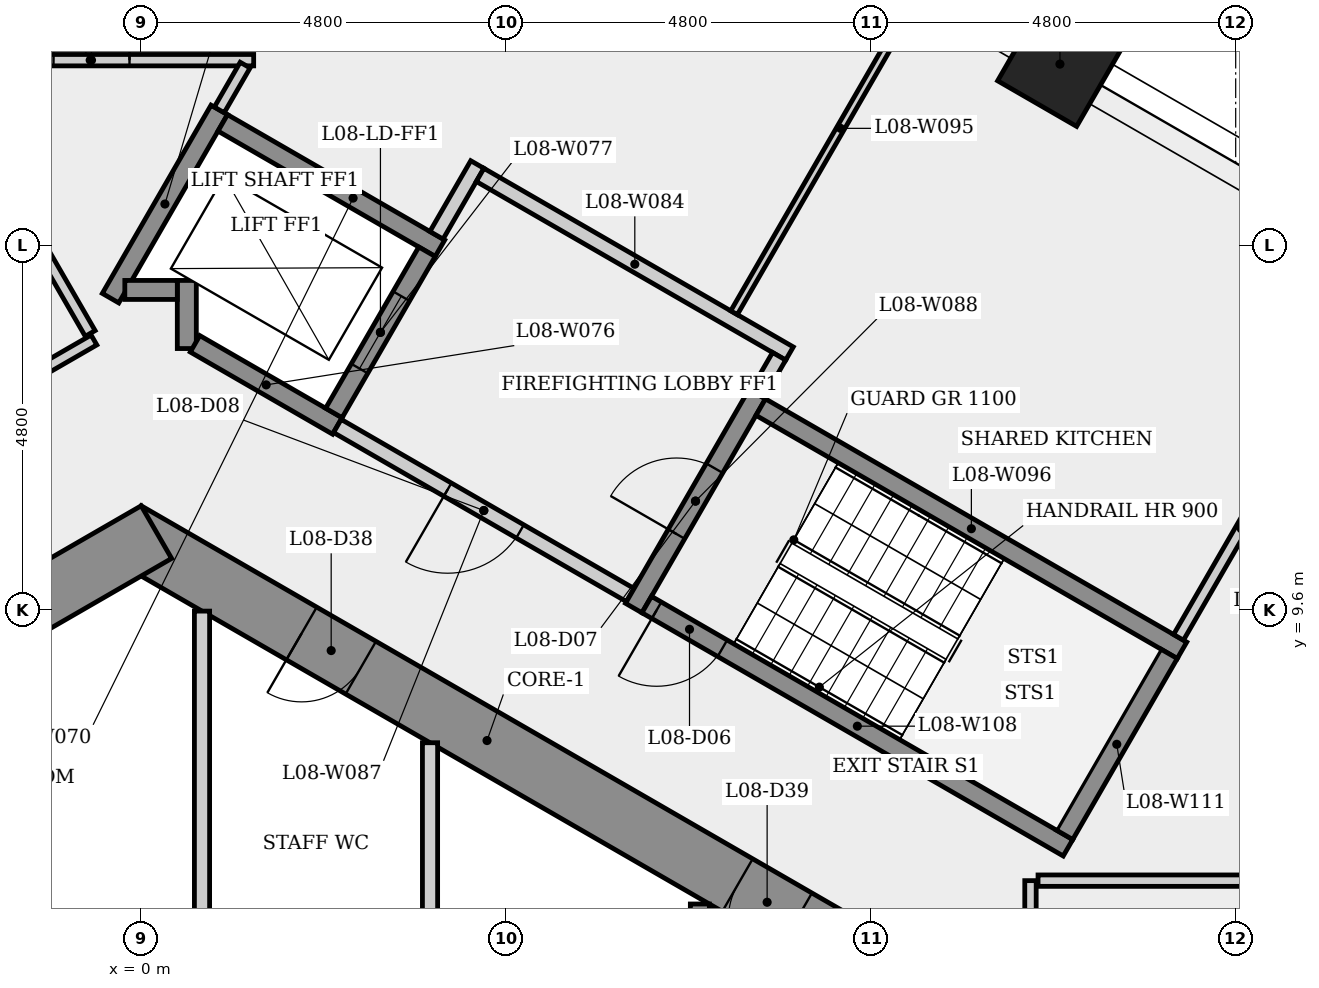
"""IFC4 building model, lengths in metres.
Left out: names, types, materials, properties, quantities, classifications, styles, units other than length and angle.
Written with IfcOpenShell. Run it as: python <this file> out.ifc"""

import sys

from ifc_helpers import new_model, si_unit, direction, frame, frame_2d, origin, origin_2d, place, context, subcontext, project, spatial, rectangle, extrude, element, fill, save


model = new_model("IFC4")
c1 = context("Model", 3, precision=1e-05, world=origin(), true_north=direction((0.0, 1.0)))
c2 = subcontext(c1, "Body", "Model", "MODEL_VIEW")
j1 = project(units=[si_unit("LENGTHUNIT", "METRE"), si_unit("PLANEANGLEUNIT", "RADIAN")], contexts=[c1])
p1 = place(None, origin())
s1 = spatial("IfcSite", under=j1, at=p1, CompositionType="ELEMENT")
p2 = place(p1, origin())
s2 = spatial("IfcBuilding", under=s1, at=p2, CompositionType="ELEMENT")
p3 = place(p2, frame((0.0, 0.0, 35.7)))
s3 = spatial("IfcBuildingStorey", under=s2, at=p3, CompositionType="ELEMENT", Elevation=35.7)
p4 = place(p3, frame((9.3, 5.138, 0.0), z_axis=(0.0, 0.0, 1.0), x_axis=(-0.866023993627, 0.500002442456, 0.0)))
e1 = element("IfcWall", 1, at=p4, inside=s3, PredefinedType="SHEAR", context=c2, shape_type="SweptSolid", body=[
    extrude(rectangle(XDim=10.97, YDim=0.8, at=frame_2d((5.485, 0.0))), origin(), (0.0, 0.0, 1.0), 3.4),
])
p5 = place(p4, frame((7.403, 0.0, 0.0)))
e2 = element("IfcOpeningElement", 2, at=p5, cuts=e1, PredefinedType="OPENING", context=c2, shape_type="SweptSolid", body=[
    extrude(rectangle(XDim=0.9, YDim=2.1, at=frame_2d((0.45, 1.05))), frame((0.0, 0.41, 0.0), z_axis=(0.0, -1.0, 0.0), x_axis=(1.0, 0.0, 0.0)), (0.0, 0.0, 1.0), 0.82),
])
p6 = place(p4, frame((0.78, 0.0, 0.0)))
e3 = element("IfcOpeningElement", 3, at=p6, cuts=e1, PredefinedType="OPENING", context=c2, shape_type="SweptSolid", body=[
    extrude(rectangle(XDim=0.9, YDim=2.1, at=frame_2d((0.45, 1.05))), frame((0.0, 0.41, 0.0), z_axis=(0.0, -1.0, 0.0), x_axis=(1.0, 0.0, 0.0)), (0.0, 0.0, 1.0), 0.82),
])
p7 = place(p3, frame((0.2, 10.623, 0.0), z_axis=(0.0, 0.0, 1.0), x_axis=(-0.866023993627, -0.500002442456, 0.0)))
e4 = element("IfcWall", 4, at=p7, inside=s3, PredefinedType="SHEAR", context=c2, shape_type="SweptSolid", body=[
    extrude(rectangle(XDim=10.97, YDim=0.8, at=frame_2d((5.485, 0.0))), origin(), (0.0, 0.0, 1.0), 3.4),
])
p8 = place(p7, frame((6.185, 0.0, 0.0)))
e5 = element("IfcOpeningElement", 5, at=p8, cuts=e4, PredefinedType="OPENING", context=c2, shape_type="SweptSolid", body=[
    extrude(rectangle(XDim=0.9, YDim=2.1, at=frame_2d((0.45, 1.05))), frame((0.0, 0.41, 0.0), z_axis=(0.0, -1.0, 0.0), x_axis=(1.0, 0.0, 0.0)), (0.0, 0.0, 1.0), 0.82),
])
p9 = place(p3, frame((12.088, 16.781, 0.0), z_axis=(0.0, 0.0, 1.0), x_axis=(0.5, 0.866025403784, 0.0)))
e6 = element("IfcColumn", 6, at=p9, inside=s3, PredefinedType="COLUMN", context=c2, shape_type="SweptSolid", body=[
    extrude(rectangle(XDim=1.2, YDim=1.2, at=origin_2d()), origin(), (0.0, 0.0, 1.0), 3.4),
])
p10 = place(p3, frame((-10.826, 7.26, 0.0), z_axis=(0.0, 0.0, 1.0), x_axis=(0.866022388473, 0.500005222637, 0.0)))
e7 = element("IfcWall", 7, at=p10, inside=s3, PredefinedType="PARTITIONING", context=c2, shape_type="SweptSolid", body=[
    extrude(rectangle(XDim=11.783, YDim=0.15, at=frame_2d((5.892, 0.0))), origin(), (0.0, 0.0, 1.0), 3.05),
])
p11 = place(p10, frame((5.89, 0.0, 0.0)))
e8 = element("IfcOpeningElement", 8, at=p11, cuts=e7, PredefinedType="OPENING", context=c2, shape_type="SweptSolid", body=[
    extrude(rectangle(XDim=1.0, YDim=2.1, at=frame_2d((0.5, 1.05))), frame((0.0, 0.085, 0.0), z_axis=(0.0, -1.0, 0.0), x_axis=(1.0, 0.0, 0.0)), (0.0, 0.0, 1.0), 0.17),
])
p12 = place(p3, frame((-2.822, 16.833, 0.0), z_axis=(0.0, 0.0, 1.0), x_axis=(1.0, 0.0, 0.0)))
e9 = element("IfcWall", 9, at=p12, inside=s3, PredefinedType="PARTITIONING", context=c2, shape_type="SweptSolid", body=[
    extrude(rectangle(XDim=4.302, YDim=0.15, at=frame_2d((2.151, 0.0))), origin(), (0.0, 0.0, 1.0), 3.05),
])
p13 = place(p12, frame((1.668, 0.0, 0.0)))
e10 = element("IfcOpeningElement", 10, at=p13, cuts=e9, PredefinedType="OPENING", context=c2, shape_type="SweptSolid", body=[
    extrude(rectangle(XDim=1.0, YDim=2.1, at=frame_2d((0.5, 1.05))), frame((0.0, 0.085, 0.0), z_axis=(0.0, -1.0, 0.0), x_axis=(1.0, 0.0, 0.0)), (0.0, 0.0, 1.0), 0.17),
])
p14 = place(p3, frame((-0.671, 13.237, 0.0), z_axis=(0.0, 0.0, 1.0), x_axis=(-0.499990257196, 0.866031028722, 0.0)))
e11 = element("IfcWall", 11, at=p14, inside=s3, PredefinedType="PARTITIONING", context=c2, shape_type="SweptSolid", body=[
    extrude(rectangle(XDim=4.077, YDim=0.15, at=frame_2d((2.039, 0.0))), origin(), (0.0, 0.0, 1.0), 3.05),
])
p15 = place(p14, frame((1.539, 0.0, 0.0)))
e12 = element("IfcOpeningElement", 12, at=p15, cuts=e11, PredefinedType="OPENING", context=c2, shape_type="SweptSolid", body=[
    extrude(rectangle(XDim=1.0, YDim=2.1, at=frame_2d((0.5, 1.05))), frame((0.0, 0.085, 0.0), z_axis=(0.0, -1.0, 0.0), x_axis=(1.0, 0.0, 0.0)), (0.0, 0.0, 1.0), 0.17),
])
p16 = place(p3, frame((-0.403, 13.702, 0.0), z_axis=(0.0, 0.0, 1.0), x_axis=(0.499976111731, 0.866039195244, 0.0)))
e13 = element("IfcWall", 13, at=p16, inside=s3, PredefinedType="SHEAR", context=c2, shape_type="SweptSolid", body=[
    extrude(rectangle(XDim=2.861, YDim=0.25, at=frame_2d((1.43, 0.0))), origin(), (0.0, 0.0, 1.0), 3.05),
])
p17 = place(p3, frame((0.6, 13.039, 0.0), z_axis=(0.0, 0.0, 1.0), x_axis=(0.0, 1.0, 0.0)))
e14 = element("IfcWall", 14, at=p17, inside=s3, PredefinedType="SHEAR", context=c2, shape_type="SweptSolid", body=[
    extrude(rectangle(XDim=0.896, YDim=0.25, at=frame_2d((0.448, 0.0))), origin(), (0.0, 0.0, 1.0), 3.05),
])
p18 = place(p3, frame((0.475, 13.81, 0.0), z_axis=(0.0, 0.0, 1.0), x_axis=(-1.0, 0.0, 0.0)))
e15 = element("IfcWall", 15, at=p18, inside=s3, PredefinedType="SHEAR", context=c2, shape_type="SweptSolid", body=[
    extrude(rectangle(XDim=0.691, YDim=0.25, at=frame_2d((0.345, 0.0))), origin(), (0.0, 0.0, 1.0), 3.4),
])
p19 = place(p3, frame((0.8, 9.584, 0.0), z_axis=(0.0, 0.0, 1.0), x_axis=(0.0, -1.0, 0.0)))
e16 = element("IfcWall", 16, at=p19, inside=s3, PredefinedType="PARTITIONING", context=c2, shape_type="SweptSolid", body=[
    extrude(rectangle(XDim=4.309, YDim=0.2, at=frame_2d((2.155, 0.0))), origin(), (0.0, 0.0, 1.0), 3.05),
])
p20 = place(p3, frame((1.073, 16.008, 0.0), z_axis=(0.0, 0.0, 1.0), x_axis=(0.866040211805, -0.499974350878, 0.0)))
e17 = element("IfcWall", 17, at=p20, inside=s3, PredefinedType="SHEAR", context=c2, shape_type="SweptSolid", body=[
    extrude(rectangle(XDim=3.3, YDim=0.25, at=frame_2d((1.65, 0.0))), origin(), (0.0, 0.0, 1.0), 3.05),
])
p21 = place(p3, frame((1.367, 16.768, 0.0), z_axis=(0.0, 0.0, 1.0), x_axis=(-0.499805281321, -0.866137795483, 0.0)))
e18 = element("IfcWall", 18, at=p21, inside=s3, PredefinedType="PARTITIONING", context=c2, shape_type="SweptSolid", body=[
    extrude(rectangle(XDim=0.68, YDim=0.15, at=frame_2d((0.34, 0.0))), origin(), (0.0, 0.0, 1.0), 3.05),
])
p22 = place(p3, frame((2.581, 12.02, 0.0), z_axis=(0.0, 0.0, 1.0), x_axis=(-0.86603892542, 0.499976579108, 0.0)))
e19 = element("IfcWall", 19, at=p22, inside=s3, PredefinedType="SHEAR", context=c2, shape_type="SweptSolid", body=[
    extrude(rectangle(XDim=2.162, YDim=0.25, at=frame_2d((1.081, 0.0))), origin(), (0.0, 0.0, 1.0), 3.05),
])
p23 = place(p3, frame((2.535, 12.191, 0.0), z_axis=(0.0, 0.0, 1.0), x_axis=(0.500061746146, 0.865989751695, 0.0)))
e20 = element("IfcWall", 20, at=p23, inside=s3, PredefinedType="SHEAR", context=c2, shape_type="SweptSolid", body=[
    extrude(rectangle(XDim=2.45, YDim=0.25, at=frame_2d((1.225, 0.0))), origin(), (0.0, 0.0, 1.0), 3.4),
])
p24 = place(p23, frame((0.675, 0.0, 0.0)))
e21 = element("IfcOpeningElement", 21, at=p24, cuts=e20, PredefinedType="OPENING", context=c2, shape_type="SweptSolid", body=[
    extrude(rectangle(XDim=1.1, YDim=2.1, at=frame_2d((0.55, 1.05))), frame((0.0, 0.135, 0.0), z_axis=(0.0, -1.0, 0.0), x_axis=(1.0, 0.0, 0.0)), (0.0, 0.0, 1.0), 0.27),
])
p25 = place(p3, frame((3.8, 7.852, 0.0), z_axis=(0.0, 0.0, 1.0), x_axis=(0.0, -1.0, 0.0)))
e22 = element("IfcWall", 22, at=p25, inside=s3, PredefinedType="PARTITIONING", context=c2, shape_type="SweptSolid", body=[
    extrude(rectangle(XDim=2.577, YDim=0.2, at=frame_2d((1.289, 0.0))), origin(), (0.0, 0.0, 1.0), 3.05),
])
p26 = place(p3, frame((3.885, 14.529, 0.0), z_axis=(0.0, 0.0, 1.0), x_axis=(0.499997628298, 0.866026773083, 0.0)))
e23 = element("IfcWall", 23, at=p26, inside=s3, PredefinedType="PARTITIONING", context=c2, shape_type="SweptSolid", body=[
    extrude(rectangle(XDim=1.075, YDim=0.2, at=frame_2d((0.538, 0.0))), origin(), (0.0, 0.0, 1.0), 3.05),
])
p27 = place(p3, frame((4.459, 15.323, 0.0), z_axis=(0.0, 0.0, 1.0), x_axis=(0.866016039709, -0.500016218704, 0.0)))
e24 = element("IfcWall", 24, at=p27, inside=s3, PredefinedType="PARTITIONING", context=c2, shape_type="SweptSolid", body=[
    extrude(rectangle(XDim=4.7, YDim=0.2, at=frame_2d((2.35, 0.0))), origin(), (0.0, 0.0, 1.0), 3.05),
])
p28 = place(p3, frame((6.435, 9.795, 0.0), z_axis=(0.0, 0.0, 1.0), x_axis=(-0.866012907634, 0.500021643343, 0.0)))
e25 = element("IfcWall", 25, at=p28, inside=s3, PredefinedType="PARTITIONING", context=c2, shape_type="SweptSolid", body=[
    extrude(rectangle(XDim=4.45, YDim=0.2, at=frame_2d((2.225, 0.0))), origin(), (0.0, 0.0, 1.0), 3.05),
])
p29 = place(p28, frame((1.675, 0.0, 0.0)))
e26 = element("IfcOpeningElement", 26, at=p29, cuts=e25, PredefinedType="OPENING", context=c2, shape_type="SweptSolid", body=[
    extrude(rectangle(XDim=1.1, YDim=2.1, at=frame_2d((0.55, 1.05))), frame((0.0, 0.11, 0.0), z_axis=(0.0, -1.0, 0.0), x_axis=(1.0, 0.0, 0.0)), (0.0, 0.0, 1.0), 0.22),
])
p30 = place(p3, frame((6.48, 9.624, 0.0), z_axis=(0.0, 0.0, 1.0), x_axis=(0.500017246033, 0.866015446554, 0.0)))
e27 = element("IfcWall", 27, at=p30, inside=s3, PredefinedType="SHEAR", context=c2, shape_type="SweptSolid", body=[
    extrude(rectangle(XDim=3.25, YDim=0.25, at=frame_2d((1.625, 0.0))), origin(), (0.0, 0.0, 1.0), 3.05),
])
p31 = place(p30, frame((1.125, 0.0, 0.0)))
e28 = element("IfcOpeningElement", 28, at=p31, cuts=e27, PredefinedType="OPENING", context=c2, shape_type="SweptSolid", body=[
    extrude(rectangle(XDim=1.0, YDim=2.1, at=frame_2d((0.5, 1.05))), frame((0.0, 0.135, 0.0), z_axis=(0.0, -1.0, 0.0), x_axis=(1.0, 0.0, 0.0)), (0.0, 0.0, 1.0), 0.27),
])
p32 = place(p3, frame((7.35, 5.73, 0.0), z_axis=(0.0, 0.0, 1.0), x_axis=(0.0, -1.0, 0.0)))
e29 = element("IfcWall", 29, at=p32, inside=s3, PredefinedType="SHEAR", context=c2, shape_type="SweptSolid", body=[
    extrude(rectangle(XDim=3.805, YDim=0.25, at=frame_2d((1.903, 0.0))), origin(), (0.0, 0.0, 1.0), 3.05),
])
p33 = place(p3, frame((7.8, 13.51, 0.0), z_axis=(0.0, 0.0, 1.0), x_axis=(0.499991527163, 0.866030295524, 0.0)))
e30 = element("IfcWall", 30, at=p33, inside=s3, PredefinedType="PARTITIONING", context=c2, shape_type="SweptSolid", body=[
    extrude(rectangle(XDim=5.603, YDim=0.1, at=frame_2d((2.801, 0.0))), origin(), (0.0, 0.0, 1.0), 3.05),
])
p34 = place(p3, frame((8.151, 12.268, 0.0), z_axis=(0.0, 0.0, 1.0), x_axis=(0.866025499775, -0.499999833739, 0.0)))
e31 = element("IfcWall", 31, at=p34, inside=s3, PredefinedType="SHEAR", context=c2, shape_type="SweptSolid", body=[
    extrude(rectangle(XDim=6.4, YDim=0.25, at=frame_2d((3.2, 0.0))), origin(), (0.0, 0.0, 1.0), 3.05),
])
p35 = place(p3, frame((8.393, 12.937, 0.0), z_axis=(0.0, 0.0, 1.0), x_axis=(-0.500065409566, -0.86598763626, 0.0)))
e32 = element("IfcWall", 32, at=p35, inside=s3, PredefinedType="PARTITIONING", context=c2, shape_type="SweptSolid", body=[
    extrude(rectangle(XDim=0.575, YDim=0.2, at=frame_2d((0.288, 0.0))), origin(), (0.0, 0.0, 1.0), 3.05),
])
p36 = place(p3, frame((11.7, -5.962, 0.0), z_axis=(0.0, 0.0, 1.0), x_axis=(0.0, 1.0, 0.0)))
e33 = element("IfcWall", 33, at=p36, inside=s3, PredefinedType="PARTITIONING", context=c2, shape_type="SweptSolid", body=[
    extrude(rectangle(XDim=12.0, YDim=0.15, at=frame_2d((6.0, 0.0))), origin(), (0.0, 0.0, 1.0), 3.05),
])
p37 = place(p36, frame((2.949, 0.0, 0.0)))
e34 = element("IfcOpeningElement", 34, at=p37, cuts=e33, PredefinedType="OPENING", context=c2, shape_type="SweptSolid", body=[
    extrude(rectangle(XDim=1.0, YDim=2.1, at=frame_2d((0.5, 1.05))), frame((0.0, 0.085, 0.0), z_axis=(0.0, -1.0, 0.0), x_axis=(1.0, 0.0, 0.0)), (0.0, 0.0, 1.0), 0.17),
])
p38 = place(p3, frame((12.194, 6.47, 0.0), z_axis=(0.0, 0.0, 1.0), x_axis=(-0.866025499775, 0.499999833739, 0.0)))
e35 = element("IfcWall", 35, at=p38, inside=s3, PredefinedType="SHEAR", context=c2, shape_type="SweptSolid", body=[
    extrude(rectangle(XDim=6.4, YDim=0.25, at=frame_2d((3.2, 0.0))), origin(), (0.0, 0.0, 1.0), 3.05),
])
p39 = place(p38, frame((5.25, 0.0, 0.0)))
e36 = element("IfcOpeningElement", 36, at=p39, cuts=e35, PredefinedType="OPENING", context=c2, shape_type="SweptSolid", body=[
    extrude(rectangle(XDim=1.0, YDim=2.1, at=frame_2d((0.5, 1.05))), frame((0.0, 0.135, 0.0), z_axis=(0.0, -1.0, 0.0), x_axis=(1.0, 0.0, 0.0)), (0.0, 0.0, 1.0), 0.27),
])
p40 = place(p3, frame((13.648, 9.239, 0.0), z_axis=(0.0, 0.0, 1.0), x_axis=(0.500004084281, 0.866023045711, 0.0)))
e37 = element("IfcWall", 37, at=p40, inside=s3, PredefinedType="PARTITIONING", context=c2, shape_type="SweptSolid", body=[
    extrude(rectangle(XDim=3.302, YDim=0.15, at=frame_2d((1.651, 0.0))), origin(), (0.0, 0.0, 1.0), 3.05),
])
p41 = place(p3, frame((13.523, 9.022, 0.0), z_axis=(0.0, 0.0, 1.0), x_axis=(-0.500034990121, -0.866005201286, 0.0)))
e38 = element("IfcWall", 38, at=p41, inside=s3, PredefinedType="SHEAR", context=c2, shape_type="SweptSolid", body=[
    extrude(rectangle(XDim=2.75, YDim=0.25, at=frame_2d((1.375, 0.0))), origin(), (0.0, 0.0, 1.0), 3.05),
])
p42 = place(p3, frame((18.648, 6.037, 0.0), z_axis=(0.0, 0.0, 1.0), x_axis=(-1.0, 0.0, 0.0)))
e39 = element("IfcWall", 39, at=p42, inside=s3, PredefinedType="PARTITIONING", context=c2, shape_type="SweptSolid", body=[
    extrude(rectangle(XDim=6.848, YDim=0.15, at=frame_2d((3.424, 0.0))), origin(), (0.0, 0.0, 1.0), 3.05),
])
p43 = place(p42, frame((2.924, 0.0, 0.0)))
e40 = element("IfcOpeningElement", 40, at=p43, cuts=e39, PredefinedType="OPENING", context=c2, shape_type="SweptSolid", body=[
    extrude(rectangle(XDim=1.0, YDim=2.1, at=frame_2d((0.5, 1.05))), frame((0.0, 0.085, 0.0), z_axis=(0.0, -1.0, 0.0), x_axis=(1.0, 0.0, 0.0)), (0.0, 0.0, 1.0), 0.17),
])
p44 = place(p39, origin())
e41 = element("IfcDoor", 41, at=p44, inside=s3, OperationType="SINGLE_SWING_RIGHT", PredefinedType="DOOR", context=c2, shape_type="SweptSolid", body=[
    extrude(rectangle(XDim=1.0, YDim=2.1, at=frame_2d((0.5, 1.05))), frame((0.0, 0.025, 0.0), z_axis=(0.0, -1.0, 0.0), x_axis=(1.0, 0.0, 0.0)), (0.0, 0.0, 1.0), 0.05),
])
fill(e36, e41)
p45 = place(p31, origin())
e42 = element("IfcDoor", 42, at=p45, inside=s3, OperationType="SINGLE_SWING_LEFT", PredefinedType="DOOR", context=c2, shape_type="SweptSolid", body=[
    extrude(rectangle(XDim=1.0, YDim=2.1, at=frame_2d((0.5, 1.05))), frame((0.0, 0.025, 0.0), z_axis=(0.0, -1.0, 0.0), x_axis=(1.0, 0.0, 0.0)), (0.0, 0.0, 1.0), 0.05),
])
fill(e28, e42)
p46 = place(p29, origin())
e43 = element("IfcDoor", 43, at=p46, inside=s3, OperationType="SINGLE_SWING_RIGHT", PredefinedType="DOOR", context=c2, shape_type="SweptSolid", body=[
    extrude(rectangle(XDim=1.1, YDim=2.1, at=frame_2d((0.55, 1.05))), frame((0.0, 0.025, 0.0), z_axis=(0.0, -1.0, 0.0), x_axis=(1.0, 0.0, 0.0)), (0.0, 0.0, 1.0), 0.05),
])
fill(e26, e43)
p47 = place(p24, origin())
e44 = element("IfcDoor", 44, at=p47, inside=s3, OperationType="SLIDING_TO_LEFT", PredefinedType="DOOR", context=c2, shape_type="SweptSolid", body=[
    extrude(rectangle(XDim=1.1, YDim=2.1, at=frame_2d((0.55, 1.05))), frame((0.0, 0.025, 0.0), z_axis=(0.0, -1.0, 0.0), x_axis=(1.0, 0.0, 0.0)), (0.0, 0.0, 1.0), 0.05),
])
fill(e21, e44)
p48 = place(p13, origin())
e45 = element("IfcDoor", 45, at=p48, inside=s3, OperationType="SINGLE_SWING_RIGHT", PredefinedType="DOOR", context=c2, shape_type="SweptSolid", body=[
    extrude(rectangle(XDim=1.0, YDim=2.1, at=frame_2d((0.5, 1.05))), frame((0.0, 0.025, 0.0), z_axis=(0.0, -1.0, 0.0), x_axis=(1.0, 0.0, 0.0)), (0.0, 0.0, 1.0), 0.05),
])
fill(e10, e45)
p49 = place(p5, origin())
e46 = element("IfcDoor", 46, at=p49, inside=s3, OperationType="SINGLE_SWING_RIGHT", PredefinedType="DOOR", context=c2, shape_type="SweptSolid", body=[
    extrude(rectangle(XDim=0.9, YDim=2.1, at=frame_2d((0.45, 1.05))), frame((0.0, 0.025, 0.0), z_axis=(0.0, -1.0, 0.0), x_axis=(1.0, 0.0, 0.0)), (0.0, 0.0, 1.0), 0.05),
])
fill(e2, e46)
p50 = place(p6, origin())
e47 = element("IfcDoor", 47, at=p50, inside=s3, OperationType="SINGLE_SWING_LEFT", PredefinedType="DOOR", context=c2, shape_type="SweptSolid", body=[
    extrude(rectangle(XDim=0.9, YDim=2.1, at=frame_2d((0.45, 1.05))), frame((0.0, 0.025, 0.0), z_axis=(0.0, -1.0, 0.0), x_axis=(1.0, 0.0, 0.0)), (0.0, 0.0, 1.0), 0.05),
])
fill(e3, e47)
save(model, sys.argv[1])
